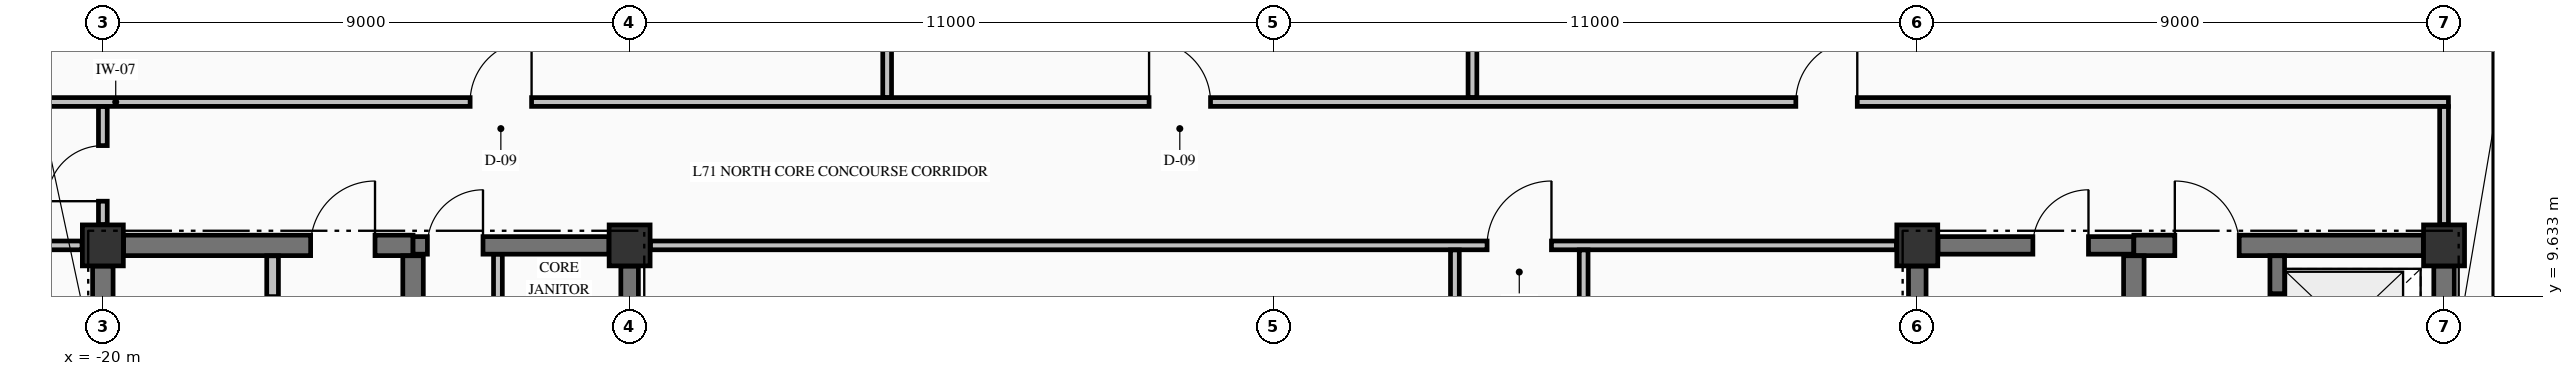
"""IFC4 building model, lengths in metres.
Left out: names, types, materials, properties, quantities, classifications, styles, units other than length and angle.
Written with IfcOpenShell. Run it as: python <this file> out.ifc"""

import sys

from ifc_helpers import new_model, si_unit, direction, frame, frame_2d, origin, origin_2d, place, context, subcontext, project, spatial, rectangle, extrude, element, fill, save


model = new_model("IFC4")
c1 = context("Model", 3, precision=1e-05, world=origin(), true_north=direction((0.0, 1.0)))
c2 = subcontext(c1, "Body", "Model", "MODEL_VIEW")
j1 = project(units=[si_unit("LENGTHUNIT", "METRE"), si_unit("PLANEANGLEUNIT", "RADIAN")], contexts=[c1])
p1 = place(None, origin())
s1 = spatial("IfcSite", under=j1, at=p1, CompositionType="ELEMENT")
p2 = place(p1, origin())
s2 = spatial("IfcBuilding", under=s1, at=p2, CompositionType="ELEMENT")
p3 = place(p2, frame((0.0, 0.0, 267.35)))
s3 = spatial("IfcBuildingStorey", under=s2, at=p3, CompositionType="ELEMENT", Elevation=267.35)
for number, where, z_axis, x_axis in (
    (1, (-20.0, 10.5, -0.25), (0.0, 0.0, 1.0), (1.0, 0.0, 0.0)),
    (2, (-11.0, 10.5, -0.25), (0.0, 0.0, 1.0), (1.0, 0.0, 0.0)),
    (3, (11.0, 10.5, -0.25), (0.0, 0.0, 1.0), (1.0, 0.0, 0.0)),
    (4, (20.0, 10.5, -0.25), (0.0, 0.0, 1.0), (1.0, 0.0, 0.0)),
):
    element("IfcColumn", number, at=place(p3, frame(where, z_axis=z_axis, x_axis=x_axis)), inside=s3, PredefinedType="COLUMN", context=c2, shape_type="SweptSolid", body=[
        extrude(rectangle(XDim=0.7, YDim=0.7, at=origin_2d()), origin(), (0.0, 0.0, 1.0), 3.155),
    ])
p4 = place(p3, frame((21.0, 9.455, 0.0), z_axis=(0.0, 0.0, 1.0), x_axis=(0.0, 1.0, 0.0)))
e5 = element("IfcWall", 5, at=p4, inside=s3, PredefinedType="STANDARD", context=c2, shape_type="SweptSolid", body=[
    extrude(rectangle(XDim=8.09, YDim=0.3, at=frame_2d((4.045, 0.0))), origin(), (0.0, 0.0, 1.0), 2.297),
])
p5 = place(p3, frame((-19.646, 10.5, 0.0), z_axis=(0.0, 0.0, 1.0), x_axis=(1.0, 0.0, 0.0)))
e6 = element("IfcWall", 6, at=p5, inside=s3, PredefinedType="SHEAR", context=c2, shape_type="SweptSolid", body=[
    extrude(rectangle(XDim=4.946, YDim=0.35, at=frame_2d((2.473, 0.0))), origin(), (0.0, 0.0, 1.0), 2.905),
])
p6 = place(p5, frame((3.196, 0.0, 0.0)))
e7 = element("IfcOpeningElement", 7, at=p6, cuts=e6, PredefinedType="OPENING", context=c2, shape_type="SweptSolid", body=[
    extrude(rectangle(XDim=1.1, YDim=2.15, at=frame_2d((0.55, 1.075))), frame((0.0, 0.185, 0.0), z_axis=(0.0, -1.0, 0.0), x_axis=(1.0, 0.0, 0.0)), (0.0, 0.0, 1.0), 0.37),
])
p7 = place(p3, frame((-14.7, 10.5, 0.0), z_axis=(0.0, 0.0, 1.0), x_axis=(1.0, 0.0, 0.0)))
e8 = element("IfcWall", 8, at=p7, inside=s3, PredefinedType="SHEAR", context=c2, shape_type="SweptSolid", body=[
    extrude(rectangle(XDim=3.346, YDim=0.3, at=frame_2d((1.673, 0.0))), origin(), (0.0, 0.0, 1.0), 2.905),
])
p8 = place(p7, frame((0.245, 0.0, 0.0)))
e9 = element("IfcOpeningElement", 9, at=p8, cuts=e8, PredefinedType="OPENING", context=c2, shape_type="SweptSolid", body=[
    extrude(rectangle(XDim=0.95, YDim=2.15, at=frame_2d((0.475, 1.075))), frame((0.0, 0.16, 0.0), z_axis=(0.0, -1.0, 0.0), x_axis=(1.0, 0.0, 0.0)), (0.0, 0.0, 1.0), 0.32),
])
p9 = place(p3, frame((11.354, 10.5, 0.0), z_axis=(0.0, 0.0, 1.0), x_axis=(1.0, 0.0, 0.0)))
e10 = element("IfcWall", 10, at=p9, inside=s3, PredefinedType="SHEAR", context=c2, shape_type="SweptSolid", body=[
    extrude(rectangle(XDim=3.346, YDim=0.3, at=frame_2d((1.673, 0.0))), origin(), (0.0, 0.0, 1.0), 2.905),
])
p10 = place(p9, frame((1.621, 0.0, 0.0)))
e11 = element("IfcOpeningElement", 11, at=p10, cuts=e10, PredefinedType="OPENING", context=c2, shape_type="SweptSolid", body=[
    extrude(rectangle(XDim=0.95, YDim=2.15, at=frame_2d((0.475, 1.075))), frame((0.0, 0.16, 0.0), z_axis=(0.0, -1.0, 0.0), x_axis=(1.0, 0.0, 0.0)), (0.0, 0.0, 1.0), 0.32),
])
p11 = place(p3, frame((14.7, 10.5, 0.0), z_axis=(0.0, 0.0, 1.0), x_axis=(1.0, 0.0, 0.0)))
e12 = element("IfcWall", 12, at=p11, inside=s3, PredefinedType="SHEAR", context=c2, shape_type="SweptSolid", body=[
    extrude(rectangle(XDim=4.946, YDim=0.35, at=frame_2d((2.473, 0.0))), origin(), (0.0, 0.0, 1.0), 2.905),
])
p12 = place(p11, frame((0.7, 0.0, 0.0)))
e13 = element("IfcOpeningElement", 13, at=p12, cuts=e12, PredefinedType="OPENING", context=c2, shape_type="SweptSolid", body=[
    extrude(rectangle(XDim=1.1, YDim=2.15, at=frame_2d((0.55, 1.075))), frame((0.0, 0.185, 0.0), z_axis=(0.0, -1.0, 0.0), x_axis=(1.0, 0.0, 0.0)), (0.0, 0.0, 1.0), 0.37),
])
p13 = place(p3, frame((-25.835, 10.5, 0.0), z_axis=(0.0, 0.0, 1.0), x_axis=(1.0, 0.0, 0.0)))
e14 = element("IfcWall", 14, at=p13, inside=s3, PredefinedType="PARTITIONING", context=c2, shape_type="SweptSolid", body=[
    extrude(rectangle(XDim=5.479, YDim=0.15, at=frame_2d((2.74, 0.0))), origin(), (0.0, 0.0, 1.0), 2.905),
])
p14 = place(p13, frame((2.335, 0.0, 0.0)))
e15 = element("IfcOpeningElement", 15, at=p14, cuts=e14, PredefinedType="OPENING", context=c2, shape_type="SweptSolid", body=[
    extrude(rectangle(XDim=1.0, YDim=2.15, at=frame_2d((0.5, 1.075))), frame((0.0, 0.085, 0.0), z_axis=(0.0, -1.0, 0.0), x_axis=(1.0, 0.0, 0.0)), (0.0, 0.0, 1.0), 0.17),
])
p15 = place(p3, frame((-10.644, 10.5, 0.0), z_axis=(0.0, 0.0, 1.0), x_axis=(1.0, 0.0, 0.0)))
e16 = element("IfcWall", 16, at=p15, inside=s3, PredefinedType="PARTITIONING", context=c2, shape_type="SweptSolid", body=[
    extrude(rectangle(XDim=21.288, YDim=0.15, at=frame_2d((10.644, 0.0))), origin(), (0.0, 0.0, 1.0), 2.905),
])
p16 = place(p15, frame((14.294, 0.0, 0.0)))
e17 = element("IfcOpeningElement", 17, at=p16, cuts=e16, PredefinedType="OPENING", context=c2, shape_type="SweptSolid", body=[
    extrude(rectangle(XDim=1.1, YDim=2.15, at=frame_2d((0.55, 1.075))), frame((0.0, 0.085, 0.0), z_axis=(0.0, -1.0, 0.0), x_axis=(1.0, 0.0, 0.0)), (0.0, 0.0, 1.0), 0.17),
])
p17 = place(p3, frame((-25.835, 12.95, 0.0), z_axis=(0.0, 0.0, 1.0), x_axis=(1.0, 0.0, 0.0)))
e18 = element("IfcWall", 18, at=p17, inside=s3, PredefinedType="PARTITIONING", context=c2, shape_type="SweptSolid", body=[
    extrude(rectangle(XDim=45.91, YDim=0.15, at=frame_2d((22.955, 0.0))), origin(), (0.0, 0.0, 1.0), 2.905),
])
p18 = place(p17, frame((12.11, 0.0, 0.0)))
e19 = element("IfcOpeningElement", 19, at=p18, cuts=e18, PredefinedType="OPENING", context=c2, shape_type="SweptSolid", body=[
    extrude(rectangle(XDim=1.05, YDim=2.15, at=frame_2d((0.525, 1.075))), frame((0.0, 0.085, 0.0), z_axis=(0.0, -1.0, 0.0), x_axis=(1.0, 0.0, 0.0)), (0.0, 0.0, 1.0), 0.17),
])
p19 = place(p17, frame((23.71, 0.0, 0.0)))
e20 = element("IfcOpeningElement", 20, at=p19, cuts=e18, PredefinedType="OPENING", context=c2, shape_type="SweptSolid", body=[
    extrude(rectangle(XDim=1.05, YDim=2.15, at=frame_2d((0.525, 1.075))), frame((0.0, 0.085, 0.0), z_axis=(0.0, -1.0, 0.0), x_axis=(1.0, 0.0, 0.0)), (0.0, 0.0, 1.0), 0.17),
])
p20 = place(p17, frame((34.76, 0.0, 0.0)))
e21 = element("IfcOpeningElement", 21, at=p20, cuts=e18, PredefinedType="OPENING", context=c2, shape_type="SweptSolid", body=[
    extrude(rectangle(XDim=1.05, YDim=2.15, at=frame_2d((0.525, 1.075))), frame((0.0, 0.085, 0.0), z_axis=(0.0, -1.0, 0.0), x_axis=(1.0, 0.0, 0.0)), (0.0, 0.0, 1.0), 0.17),
])
p21 = place(p3, frame((-20.0, 5.327, 0.0), z_axis=(0.0, 0.0, 1.0), x_axis=(0.0, 1.0, 0.0)))
e22 = element("IfcWall", 22, at=p21, inside=s3, PredefinedType="SHEAR", context=c2, shape_type="SweptSolid", body=[
    extrude(rectangle(XDim=4.819, YDim=0.35, at=frame_2d((2.41, 0.0))), origin(), (0.0, 0.0, 1.0), 2.905),
])
p22 = place(p3, frame((-14.7, 5.852, 0.0), z_axis=(0.0, 0.0, 1.0), x_axis=(0.0, 1.0, 0.0)))
e23 = element("IfcWall", 23, at=p22, inside=s3, PredefinedType="SHEAR", context=c2, shape_type="SweptSolid", body=[
    extrude(rectangle(XDim=4.471, YDim=0.35, at=frame_2d((2.235, 0.0))), origin(), (0.0, 0.0, 1.0), 2.905),
])
for number, where, z_axis, x_axis in (
    (24, (-11.0, 5.852, 0.0), (0.0, 0.0, 1.0), (0.0, 1.0, 0.0)),
    (25, (11.0, 5.852, 0.0), (0.0, 0.0, 1.0), (0.0, 1.0, 0.0)),
):
    element("IfcWall", number, at=place(p3, frame(where, z_axis=z_axis, x_axis=x_axis)), inside=s3, PredefinedType="SHEAR", context=c2, shape_type="SweptSolid", body=[
        extrude(rectangle(XDim=4.294, YDim=0.3, at=frame_2d((2.147, 0.0))), origin(), (0.0, 0.0, 1.0), 2.905),
    ])
p23 = place(p3, frame((14.7, 5.852, 0.0), z_axis=(0.0, 0.0, 1.0), x_axis=(0.0, 1.0, 0.0)))
e26 = element("IfcWall", 26, at=p23, inside=s3, PredefinedType="SHEAR", context=c2, shape_type="SweptSolid", body=[
    extrude(rectangle(XDim=4.471, YDim=0.35, at=frame_2d((2.235, 0.0))), origin(), (0.0, 0.0, 1.0), 2.905),
])
p24 = place(p3, frame((17.15, 7.877, 0.0), z_axis=(0.0, 0.0, 1.0), x_axis=(0.0, 1.0, 0.0)))
e27 = element("IfcWall", 27, at=p24, inside=s3, PredefinedType="SOLIDWALL", context=c2, shape_type="SweptSolid", body=[
    extrude(rectangle(XDim=2.446, YDim=0.25, at=frame_2d((1.223, 0.0))), origin(), (0.0, 0.0, 1.0), 2.905),
])
p25 = place(p24, frame((0.698, 0.0, 0.0)))
e28 = element("IfcOpeningElement", 28, at=p25, cuts=e27, PredefinedType="OPENING", context=c2, shape_type="SweptSolid", body=[
    extrude(rectangle(XDim=1.1, YDim=2.2, at=frame_2d((0.55, 1.1))), frame((0.0, 0.135, 0.0), z_axis=(0.0, -1.0, 0.0), x_axis=(1.0, 0.0, 0.0)), (0.0, 0.0, 1.0), 0.27),
])
p26 = place(p3, frame((20.0, 7.877, 0.0), z_axis=(0.0, 0.0, 1.0), x_axis=(0.0, 1.0, 0.0)))
e29 = element("IfcWall", 29, at=p26, inside=s3, PredefinedType="SHEAR", context=c2, shape_type="SweptSolid", body=[
    extrude(rectangle(XDim=2.269, YDim=0.35, at=frame_2d((1.135, 0.0))), origin(), (0.0, 0.0, 1.0), 2.905),
])
p27 = place(p3, frame((-20.0, 10.856, 0.0), z_axis=(0.0, 0.0, 1.0), x_axis=(0.0, 1.0, 0.0)))
e30 = element("IfcWall", 30, at=p27, inside=s3, PredefinedType="PARTITIONING", context=c2, shape_type="SweptSolid", body=[
    extrude(rectangle(XDim=2.016, YDim=0.15, at=frame_2d((1.008, 0.0))), origin(), (0.0, 0.0, 1.0), 2.905),
])
p28 = place(p27, frame((0.399, 0.0, 0.0)))
e31 = element("IfcOpeningElement", 31, at=p28, cuts=e30, PredefinedType="OPENING", context=c2, shape_type="SweptSolid", body=[
    extrude(rectangle(XDim=0.95, YDim=2.15, at=frame_2d((0.475, 1.075))), frame((0.0, 0.085, 0.0), z_axis=(0.0, -1.0, 0.0), x_axis=(1.0, 0.0, 0.0)), (0.0, 0.0, 1.0), 0.17),
])
p29 = place(p3, frame((-17.1, 7.928, 0.0), z_axis=(0.0, 0.0, 1.0), x_axis=(0.0, 1.0, 0.0)))
e32 = element("IfcWall", 32, at=p29, inside=s3, PredefinedType="PARTITIONING", context=c2, shape_type="SweptSolid", body=[
    extrude(rectangle(XDim=2.394, YDim=0.2, at=frame_2d((1.197, 0.0))), origin(), (0.0, 0.0, 1.0), 2.905),
])
p30 = place(p29, frame((0.747, 0.0, 0.0)))
e33 = element("IfcOpeningElement", 33, at=p30, cuts=e32, PredefinedType="OPENING", context=c2, shape_type="SweptSolid", body=[
    extrude(rectangle(XDim=0.95, YDim=2.15, at=frame_2d((0.475, 1.075))), frame((0.0, 0.11, 0.0), z_axis=(0.0, -1.0, 0.0), x_axis=(1.0, 0.0, 0.0)), (0.0, 0.0, 1.0), 0.22),
])
p31 = place(p3, frame((-13.25, 5.853, 0.0), z_axis=(0.0, 0.0, 1.0), x_axis=(0.0, 1.0, 0.0)))
e34 = element("IfcWall", 34, at=p31, inside=s3, PredefinedType="PARTITIONING", context=c2, shape_type="SweptSolid", body=[
    extrude(rectangle(XDim=4.494, YDim=0.15, at=frame_2d((2.247, 0.0))), origin(), (0.0, 0.0, 1.0), 2.905),
])
p32 = place(p31, frame((1.472, 0.0, 0.0)))
e35 = element("IfcOpeningElement", 35, at=p32, cuts=e34, PredefinedType="OPENING", context=c2, shape_type="SweptSolid", body=[
    extrude(rectangle(XDim=0.95, YDim=2.15, at=frame_2d((0.475, 1.075))), frame((0.0, 0.085, 0.0), z_axis=(0.0, -1.0, 0.0), x_axis=(1.0, 0.0, 0.0)), (0.0, 0.0, 1.0), 0.17),
])
p33 = place(p3, frame((-6.6, 13.028, 0.0), z_axis=(0.0, 0.0, 1.0), x_axis=(0.0, 1.0, 0.0)))
e36 = element("IfcWall", 36, at=p33, inside=s3, PredefinedType="PARTITIONING", context=c2, shape_type="SweptSolid", body=[
    extrude(rectangle(XDim=10.307, YDim=0.15, at=frame_2d((5.153, 0.0))), origin(), (0.0, 0.0, 1.0), 2.905),
])
p34 = place(p3, frame((3.1, 2.978, 0.0), z_axis=(0.0, 0.0, 1.0), x_axis=(0.0, 1.0, 0.0)))
e37 = element("IfcWall", 37, at=p34, inside=s3, PredefinedType="PARTITIONING", context=c2, shape_type="SweptSolid", body=[
    extrude(rectangle(XDim=7.444, YDim=0.15, at=frame_2d((3.722, 0.0))), origin(), (0.0, 0.0, 1.0), 2.905),
])
p35 = place(p3, frame((3.4, 13.028, 0.0), z_axis=(0.0, 0.0, 1.0), x_axis=(0.0, 1.0, 0.0)))
e38 = element("IfcWall", 38, at=p35, inside=s3, PredefinedType="PARTITIONING", context=c2, shape_type="SweptSolid", body=[
    extrude(rectangle(XDim=10.307, YDim=0.15, at=frame_2d((5.153, 0.0))), origin(), (0.0, 0.0, 1.0), 2.905),
])
p36 = place(p3, frame((5.3, 2.978, 0.0), z_axis=(0.0, 0.0, 1.0), x_axis=(0.0, 1.0, 0.0)))
e39 = element("IfcWall", 39, at=p36, inside=s3, PredefinedType="PARTITIONING", context=c2, shape_type="SweptSolid", body=[
    extrude(rectangle(XDim=7.444, YDim=0.15, at=frame_2d((3.722, 0.0))), origin(), (0.0, 0.0, 1.0), 2.905),
])
p37 = place(p3, frame((20.0, 10.856, 0.0), z_axis=(0.0, 0.0, 1.0), x_axis=(0.0, 1.0, 0.0)))
e40 = element("IfcWall", 40, at=p37, inside=s3, PredefinedType="PARTITIONING", context=c2, shape_type="SweptSolid", body=[
    extrude(rectangle(XDim=2.016, YDim=0.15, at=frame_2d((1.008, 0.0))), origin(), (0.0, 0.0, 1.0), 2.495),
])
p38 = place(p8, origin())
e41 = element("IfcDoor", 41, at=p38, inside=s3, OperationType="SINGLE_SWING_RIGHT", PredefinedType="DOOR", context=c2, shape_type="SweptSolid", body=[
    extrude(rectangle(XDim=0.95, YDim=2.15, at=frame_2d((0.475, 1.075))), frame((0.0, 0.025, 0.0), z_axis=(0.0, -1.0, 0.0), x_axis=(1.0, 0.0, 0.0)), (0.0, 0.0, 1.0), 0.05),
])
fill(e9, e41)
p39 = place(p10, origin())
e42 = element("IfcDoor", 42, at=p39, inside=s3, OperationType="SINGLE_SWING_RIGHT", PredefinedType="DOOR", context=c2, shape_type="SweptSolid", body=[
    extrude(rectangle(XDim=0.95, YDim=2.15, at=frame_2d((0.475, 1.075))), frame((0.0, 0.025, 0.0), z_axis=(0.0, -1.0, 0.0), x_axis=(1.0, 0.0, 0.0)), (0.0, 0.0, 1.0), 0.05),
])
fill(e11, e42)
p40 = place(p6, origin())
e43 = element("IfcDoor", 43, at=p40, inside=s3, OperationType="SINGLE_SWING_RIGHT", PredefinedType="DOOR", context=c2, shape_type="SweptSolid", body=[
    extrude(rectangle(XDim=1.1, YDim=2.15, at=frame_2d((0.55, 1.075))), frame((0.0, 0.025, 0.0), z_axis=(0.0, -1.0, 0.0), x_axis=(1.0, 0.0, 0.0)), (0.0, 0.0, 1.0), 0.05),
])
fill(e7, e43)
p41 = place(p25, origin())
e44 = element("IfcDoor", 44, at=p41, inside=s3, OperationType="SLIDING_TO_RIGHT", PredefinedType="DOOR", context=c2, shape_type="SweptSolid", body=[
    extrude(rectangle(XDim=1.1, YDim=2.2, at=frame_2d((0.55, 1.1))), frame((0.0, 0.025, 0.0), z_axis=(0.0, -1.0, 0.0), x_axis=(1.0, 0.0, 0.0)), (0.0, 0.0, 1.0), 0.05),
])
fill(e28, e44)
p42 = place(p12, origin())
e45 = element("IfcDoor", 45, at=p42, inside=s3, OperationType="SINGLE_SWING_LEFT", PredefinedType="DOOR", context=c2, shape_type="SweptSolid", body=[
    extrude(rectangle(XDim=1.1, YDim=2.15, at=frame_2d((0.55, 1.075))), frame((0.0, 0.025, 0.0), z_axis=(0.0, -1.0, 0.0), x_axis=(1.0, 0.0, 0.0)), (0.0, 0.0, 1.0), 0.05),
])
fill(e13, e45)
p43 = place(p16, origin())
e46 = element("IfcDoor", 46, at=p43, inside=s3, OperationType="SINGLE_SWING_RIGHT", PredefinedType="DOOR", context=c2, shape_type="SweptSolid", body=[
    extrude(rectangle(XDim=1.1, YDim=2.15, at=frame_2d((0.55, 1.075))), frame((0.0, 0.025, 0.0), z_axis=(0.0, -1.0, 0.0), x_axis=(1.0, 0.0, 0.0)), (0.0, 0.0, 1.0), 0.05),
])
fill(e17, e46)
p44 = place(p18, origin())
e47 = element("IfcDoor", 47, at=p44, inside=s3, OperationType="SINGLE_SWING_RIGHT", PredefinedType="DOOR", context=c2, shape_type="SweptSolid", body=[
    extrude(rectangle(XDim=1.05, YDim=2.15, at=frame_2d((0.525, 1.075))), frame((0.0, 0.025, 0.0), z_axis=(0.0, -1.0, 0.0), x_axis=(1.0, 0.0, 0.0)), (0.0, 0.0, 1.0), 0.05),
])
fill(e19, e47)
p45 = place(p19, origin())
e48 = element("IfcDoor", 48, at=p45, inside=s3, OperationType="SINGLE_SWING_LEFT", PredefinedType="DOOR", context=c2, shape_type="SweptSolid", body=[
    extrude(rectangle(XDim=1.05, YDim=2.15, at=frame_2d((0.525, 1.075))), frame((0.0, 0.025, 0.0), z_axis=(0.0, -1.0, 0.0), x_axis=(1.0, 0.0, 0.0)), (0.0, 0.0, 1.0), 0.05),
])
fill(e20, e48)
p46 = place(p20, origin())
e49 = element("IfcDoor", 49, at=p46, inside=s3, OperationType="SINGLE_SWING_RIGHT", PredefinedType="DOOR", context=c2, shape_type="SweptSolid", body=[
    extrude(rectangle(XDim=1.05, YDim=2.15, at=frame_2d((0.525, 1.075))), frame((0.0, 0.025, 0.0), z_axis=(0.0, -1.0, 0.0), x_axis=(1.0, 0.0, 0.0)), (0.0, 0.0, 1.0), 0.05),
])
fill(e21, e49)
p47 = place(p28, origin())
e50 = element("IfcDoor", 50, at=p47, inside=s3, OperationType="SINGLE_SWING_LEFT", PredefinedType="DOOR", context=c2, shape_type="SweptSolid", body=[
    extrude(rectangle(XDim=0.95, YDim=2.15, at=frame_2d((0.475, 1.075))), frame((0.0, 0.025, 0.0), z_axis=(0.0, -1.0, 0.0), x_axis=(1.0, 0.0, 0.0)), (0.0, 0.0, 1.0), 0.05),
])
fill(e31, e50)
save(model, sys.argv[1])
